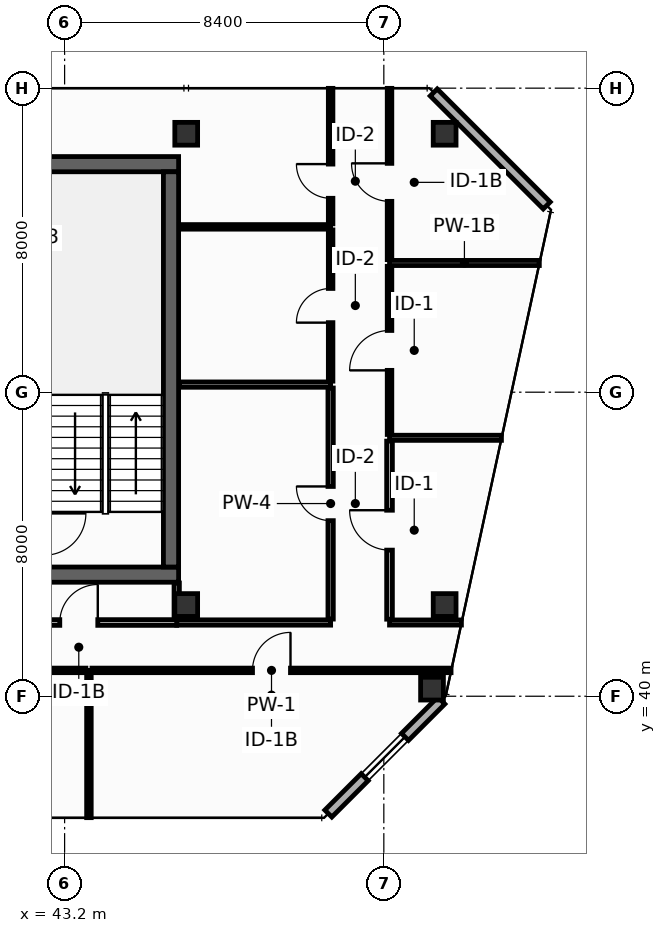
"""IFC4 building model, lengths in metres.
Left out: names, types, materials, properties, quantities, classifications, styles, units other than length and angle.
Written with IfcOpenShell. Run it as: python <this file> out.ifc"""

import sys

from ifc_helpers import new_model, si_unit, direction, frame, frame_2d, origin, origin_2d, place, context, subcontext, project, spatial, rectangle, hollow_rectangle, extrude, element, fill, save


model = new_model("IFC4")
c1 = context("Model", 3, precision=1e-05, world=origin(), true_north=direction((0.0, 1.0)))
c2 = subcontext(c1, "Body", "Model", "MODEL_VIEW")
j1 = project(units=[si_unit("LENGTHUNIT", "METRE"), si_unit("PLANEANGLEUNIT", "RADIAN")], contexts=[c1])
p1 = place(None, origin())
s1 = spatial("IfcSite", under=j1, at=p1, CompositionType="ELEMENT")
p2 = place(p1, origin())
s2 = spatial("IfcBuilding", under=s1, at=p2, CompositionType="ELEMENT")
p3 = place(p2, frame((0.0, 0.0, 319.2)))
s3 = spatial("IfcBuildingStorey", under=s2, at=p3, CompositionType="ELEMENT", Elevation=319.2)
p4 = place(p3, frame((13.7, 43.2, 0.0), z_axis=(0.0, 0.0, 1.0), x_axis=(1.0, 0.0, 0.0)))
e1 = element("IfcWall", 1, at=p4, inside=s3, PredefinedType="SHEAR", context=c2, shape_type="SweptSolid", body=[
    extrude(rectangle(XDim=32.5, YDim=0.4, at=frame_2d((16.25, 0.0))), origin(), (0.0, 0.0, 1.0), 3.95),
])
p5 = place(p4, frame((5.4, 0.0, 0.0)))
e2 = element("IfcOpeningElement", 2, at=p5, cuts=e1, PredefinedType="OPENING", context=c2, shape_type="SweptSolid", body=[
    extrude(rectangle(XDim=1.1, YDim=2.15, at=frame_2d((0.55, 1.075))), frame((0.0, 0.21, 0.0), z_axis=(0.0, -1.0, 0.0), x_axis=(1.0, 0.0, 0.0)), (0.0, 0.0, 1.0), 0.42),
])
p6 = place(p4, frame((25.6, 0.0, 0.0)))
e3 = element("IfcOpeningElement", 3, at=p6, cuts=e1, PredefinedType="OPENING", context=c2, shape_type="SweptSolid", body=[
    extrude(rectangle(XDim=1.1, YDim=2.15, at=frame_2d((0.55, 1.075))), frame((0.0, 0.21, 0.0), z_axis=(0.0, -1.0, 0.0), x_axis=(1.0, 0.0, 0.0)), (0.0, 0.0, 1.0), 0.42),
])
p7 = place(p3, frame((13.7, 54.0, 0.0), z_axis=(0.0, 0.0, 1.0), x_axis=(1.0, 0.0, 0.0)))
e4 = element("IfcWall", 4, at=p7, inside=s3, PredefinedType="SHEAR", context=c2, shape_type="SweptSolid", body=[
    extrude(rectangle(XDim=32.5, YDim=0.4, at=frame_2d((16.25, 0.0))), origin(), (0.0, 0.0, 1.0), 3.95),
])
p8 = place(p3, frame((46.0, 43.4, 0.0), z_axis=(0.0, 0.0, 1.0), x_axis=(0.0, 1.0, 0.0)))
e5 = element("IfcWall", 5, at=p8, inside=s3, PredefinedType="SHEAR", context=c2, shape_type="SweptSolid", body=[
    extrude(rectangle(XDim=10.4, YDim=0.4, at=frame_2d((5.2, 0.0))), origin(), (0.0, 0.0, 1.0), 3.95),
])
for number, where, z_axis, x_axis in (
    (6, (46.4, 54.8, 0.0), (0.0, 0.0, 1.0), (1.0, 0.0, 0.0)),
    (7, (53.2, 54.8, 0.0), (0.0, 0.0, 1.0), (1.0, 0.0, 0.0)),
    (8, (46.4, 42.4, 0.0), (0.0, 0.0, 1.0), (1.0, 0.0, 0.0)),
    (9, (53.2, 42.4, 0.0), (0.0, 0.0, 1.0), (1.0, 0.0, 0.0)),
    (10, (52.868, 40.2, 0.0), (0.0, 0.0, 1.0), (1.0, 0.0, 0.0)),
):
    element("IfcColumn", number, at=place(p3, frame(where, z_axis=z_axis, x_axis=x_axis)), inside=s3, PredefinedType="COLUMN", context=c2, shape_type="SweptSolid", body=[
        extrude(hollow_rectangle(XDim=0.6, YDim=0.6, WallThickness=0.028, at=origin_2d()), origin(), (0.0, 0.0, 1.0), 4.2),
    ])
p9 = place(p3, frame((50.14, 36.913, 0.0), z_axis=(0.0, 0.0, 1.0), x_axis=(0.70707775441, 0.707135806771, 0.0)))
e11 = element("IfcWall", 11, at=p9, inside=s3, PredefinedType="STANDARD", context=c2, shape_type="SweptSolid", body=[
    extrude(rectangle(XDim=4.206, YDim=0.26, at=frame_2d((2.103, 0.0))), origin(), (0.0, 0.0, 1.0), 3.95),
])
p10 = place(p9, frame((1.353, 0.0, 0.9)))
e12 = element("IfcOpeningElement", 12, at=p10, cuts=e11, PredefinedType="OPENING", context=c2, shape_type="SweptSolid", body=[
    extrude(rectangle(XDim=1.5, YDim=1.85, at=frame_2d((0.75, 0.925))), frame((0.0, 0.14, 0.0), z_axis=(0.0, -1.0, 0.0), x_axis=(1.0, 0.0, 0.0)), (0.0, 0.0, 1.0), 0.28),
])
p11 = place(p3, frame((55.887, 52.913, 0.0), z_axis=(0.0, 0.0, 1.0), x_axis=(-0.707106781187, 0.707106781187, 0.0)))
e13 = element("IfcWall", 13, at=p11, inside=s3, PredefinedType="STANDARD", context=c2, shape_type="SweptSolid", body=[
    extrude(rectangle(XDim=4.206, YDim=0.26, at=frame_2d((2.103, 0.0))), origin(), (0.0, 0.0, 1.0), 3.95),
])
p12 = place(p3, frame((46.15, 41.94, 0.0), z_axis=(0.0, 0.0, 1.0), x_axis=(1.0, 0.0, 0.0)))
e14 = element("IfcWall", 14, at=p12, inside=s3, PredefinedType="PARTITIONING", context=c2, shape_type="SweptSolid", body=[
    extrude(rectangle(XDim=4.05, YDim=0.14, at=frame_2d((2.025, 0.0))), origin(), (0.0, 0.0, 1.0), 3.95),
])
p13 = place(p3, frame((46.15, 42.03, 0.0), z_axis=(0.0, 0.0, 1.0), x_axis=(0.0, 1.0, 0.0)))
e15 = element("IfcWall", 15, at=p13, inside=s3, PredefinedType="PARTITIONING", context=c2, shape_type="SweptSolid", body=[
    extrude(rectangle(XDim=0.95, YDim=0.14, at=frame_2d((0.475, 0.0))), origin(), (0.0, 0.0, 1.0), 3.95),
])
p14 = place(p3, frame((46.22, 48.2, 0.0), z_axis=(0.0, 0.0, 1.0), x_axis=(1.0, 0.0, 0.0)))
e16 = element("IfcWall", 16, at=p14, inside=s3, PredefinedType="PARTITIONING", context=c2, shape_type="SweptSolid", body=[
    extrude(rectangle(XDim=3.98, YDim=0.14, at=frame_2d((1.99, 0.0))), origin(), (0.0, 0.0, 1.0), 3.95),
])
p15 = place(p3, frame((50.2, 42.03, 0.0), z_axis=(0.0, 0.0, 1.0), x_axis=(0.0, 1.0, 0.0)))
e17 = element("IfcWall", 17, at=p15, inside=s3, PredefinedType="PARTITIONING", context=c2, shape_type="SweptSolid", body=[
    extrude(rectangle(XDim=6.08, YDim=0.14, at=frame_2d((3.04, 0.0))), origin(), (0.0, 0.0, 1.0), 3.347),
])
p16 = place(p15, frame((2.59, 0.0, 0.0)))
e18 = element("IfcOpeningElement", 18, at=p16, cuts=e17, PredefinedType="OPENING", context=c2, shape_type="SweptSolid", body=[
    extrude(rectangle(XDim=0.9, YDim=2.1, at=frame_2d((0.45, 1.05))), frame((0.0, 0.08, 0.0), z_axis=(0.0, -1.0, 0.0), x_axis=(1.0, 0.0, 0.0)), (0.0, 0.0, 1.0), 0.16),
])
p17 = place(p3, frame((46.22, 52.35, 0.0), z_axis=(0.0, 0.0, 1.0), x_axis=(1.0, 0.0, 0.0)))
e19 = element("IfcWall", 19, at=p17, inside=s3, PredefinedType="PARTITIONING", context=c2, shape_type="SweptSolid", body=[
    extrude(rectangle(XDim=3.98, YDim=0.12, at=frame_2d((1.99, 0.0))), origin(), (0.0, 0.0, 1.0), 3.95),
])
p18 = place(p3, frame((50.2, 48.29, 0.0), z_axis=(0.0, 0.0, 1.0), x_axis=(0.0, 1.0, 0.0)))
e20 = element("IfcWall", 20, at=p18, inside=s3, PredefinedType="PARTITIONING", context=c2, shape_type="SweptSolid", body=[
    extrude(rectangle(XDim=3.98, YDim=0.12, at=frame_2d((1.99, 0.0))), origin(), (0.0, 0.0, 1.0), 3.95),
])
p19 = place(p18, frame((1.54, 0.0, 0.0)))
e21 = element("IfcOpeningElement", 21, at=p19, cuts=e20, PredefinedType="OPENING", context=c2, shape_type="SweptSolid", body=[
    extrude(rectangle(XDim=0.9, YDim=2.1, at=frame_2d((0.45, 1.05))), frame((0.0, 0.07, 0.0), z_axis=(0.0, -1.0, 0.0), x_axis=(1.0, 0.0, 0.0)), (0.0, 0.0, 1.0), 0.14),
])
p20 = place(p3, frame((50.2, 52.43, 0.0), z_axis=(0.0, 0.0, 1.0), x_axis=(0.0, 1.0, 0.0)))
e22 = element("IfcWall", 22, at=p20, inside=s3, PredefinedType="PARTITIONING", context=c2, shape_type="SweptSolid", body=[
    extrude(rectangle(XDim=3.565, YDim=0.12, at=frame_2d((1.783, 0.0))), origin(), (0.0, 0.0, 1.0), 3.335),
])
p21 = place(p20, frame((0.672, 0.0, 0.0)))
e23 = element("IfcOpeningElement", 23, at=p21, cuts=e22, PredefinedType="OPENING", context=c2, shape_type="SweptSolid", body=[
    extrude(rectangle(XDim=0.9, YDim=2.1, at=frame_2d((0.45, 1.05))), frame((0.0, 0.07, 0.0), z_axis=(0.0, -1.0, 0.0), x_axis=(1.0, 0.0, 0.0)), (0.0, 0.0, 1.0), 0.14),
])
p22 = place(p3, frame((51.75, 41.94, 0.0), z_axis=(0.0, 0.0, 1.0), x_axis=(1.0, 0.0, 0.0)))
e24 = element("IfcWall", 24, at=p22, inside=s3, PredefinedType="PARTITIONING", context=c2, shape_type="SweptSolid", body=[
    extrude(rectangle(XDim=1.892, YDim=0.135, at=frame_2d((0.946, 0.0))), origin(), (0.0, 0.0, 1.0), 3.485),
])
p23 = place(p3, frame((51.75, 46.8, 0.0), z_axis=(0.0, 0.0, 1.0), x_axis=(1.0, 0.0, 0.0)))
e25 = element("IfcWall", 25, at=p23, inside=s3, PredefinedType="PARTITIONING", context=c2, shape_type="SweptSolid", body=[
    extrude(rectangle(XDim=2.945, YDim=0.135, at=frame_2d((1.472, 0.0))), origin(), (0.0, 0.0, 1.0), 3.347),
])
p24 = place(p3, frame((51.75, 51.4, 0.0), z_axis=(0.0, 0.0, 1.0), x_axis=(1.0, 0.0, 0.0)))
e26 = element("IfcWall", 26, at=p24, inside=s3, PredefinedType="PARTITIONING", context=c2, shape_type="SweptSolid", body=[
    extrude(rectangle(XDim=3.942, YDim=0.135, at=frame_2d((1.971, 0.0))), origin(), (0.0, 0.0, 1.0), 3.347),
])
p25 = place(p3, frame((51.75, 42.028, 0.0), z_axis=(0.0, 0.0, 1.0), x_axis=(0.0, 1.0, 0.0)))
e27 = element("IfcWall", 27, at=p25, inside=s3, PredefinedType="PARTITIONING", context=c2, shape_type="SweptSolid", body=[
    extrude(rectangle(XDim=4.685, YDim=0.15, at=frame_2d((2.342, 0.0))), origin(), (0.0, 0.0, 1.0), 3.347),
])
p26 = place(p25, frame((1.817, 0.0, 0.0)))
e28 = element("IfcOpeningElement", 28, at=p26, cuts=e27, PredefinedType="OPENING", context=c2, shape_type="SweptSolid", body=[
    extrude(rectangle(XDim=1.05, YDim=2.15, at=frame_2d((0.525, 1.075))), frame((0.0, 0.085, 0.0), z_axis=(0.0, -1.0, 0.0), x_axis=(1.0, 0.0, 0.0)), (0.0, 0.0, 1.0), 0.17),
])
p27 = place(p3, frame((51.75, 46.887, 0.0), z_axis=(0.0, 0.0, 1.0), x_axis=(0.0, 1.0, 0.0)))
e29 = element("IfcWall", 29, at=p27, inside=s3, PredefinedType="PARTITIONING", context=c2, shape_type="SweptSolid", body=[
    extrude(rectangle(XDim=4.425, YDim=0.12, at=frame_2d((2.212, 0.0))), origin(), (0.0, 0.0, 1.0), 3.95),
])
p28 = place(p27, frame((1.687, 0.0, 0.0)))
e30 = element("IfcOpeningElement", 30, at=p28, cuts=e29, PredefinedType="OPENING", context=c2, shape_type="SweptSolid", body=[
    extrude(rectangle(XDim=1.05, YDim=2.15, at=frame_2d((0.525, 1.075))), frame((0.0, 0.07, 0.0), z_axis=(0.0, -1.0, 0.0), x_axis=(1.0, 0.0, 0.0)), (0.0, 0.0, 1.0), 0.14),
])
p29 = place(p3, frame((51.75, 51.488, 0.0), z_axis=(0.0, 0.0, 1.0), x_axis=(0.0, 1.0, 0.0)))
e31 = element("IfcWall", 31, at=p29, inside=s3, PredefinedType="PARTITIONING", context=c2, shape_type="SweptSolid", body=[
    extrude(rectangle(XDim=4.508, YDim=0.12, at=frame_2d((2.254, 0.0))), origin(), (0.0, 0.0, 1.0), 3.335),
])
p30 = place(p29, frame((1.534, 0.0, 0.0)))
e32 = element("IfcOpeningElement", 32, at=p30, cuts=e31, PredefinedType="OPENING", context=c2, shape_type="SweptSolid", body=[
    extrude(rectangle(XDim=1.0, YDim=2.15, at=frame_2d((0.5, 1.075))), frame((0.0, 0.07, 0.0), z_axis=(0.0, -1.0, 0.0), x_axis=(1.0, 0.0, 0.0)), (0.0, 0.0, 1.0), 0.14),
])
p31 = place(p3, frame((40.995, 41.94, 0.0), z_axis=(0.0, 0.0, 1.0), x_axis=(1.0, 0.0, 0.0)))
e33 = element("IfcWall", 33, at=p31, inside=s3, PredefinedType="PARTITIONING", context=c2, shape_type="SweptSolid", body=[
    extrude(rectangle(XDim=5.155, YDim=0.15, at=frame_2d((2.577, 0.0))), origin(), (0.0, 0.0, 1.0), 3.95),
])
p32 = place(p31, frame((2.078, 0.0, 0.0)))
e34 = element("IfcOpeningElement", 34, at=p32, cuts=e33, PredefinedType="OPENING", context=c2, shape_type="SweptSolid", body=[
    extrude(rectangle(XDim=1.0, YDim=2.15, at=frame_2d((0.5, 1.075))), frame((0.0, 0.085, 0.0), z_axis=(0.0, -1.0, 0.0), x_axis=(1.0, 0.0, 0.0)), (0.0, 0.0, 1.0), 0.17),
])
p33 = place(p3, frame((43.84, 36.805, 0.0), z_axis=(0.0, 0.0, 1.0), x_axis=(0.0, 1.0, 0.0)))
e35 = element("IfcWall", 35, at=p33, inside=s3, PredefinedType="PARTITIONING", context=c2, shape_type="SweptSolid", body=[
    extrude(rectangle(XDim=3.875, YDim=0.12, at=frame_2d((1.938, 0.0))), origin(), (0.0, 0.0, 1.0), 3.95),
])
p34 = place(p3, frame((36.067, 40.68, 0.0), z_axis=(0.0, 0.0, 1.0), x_axis=(1.0, 0.0, 0.0)))
e36 = element("IfcWall", 36, at=p34, inside=s3, PredefinedType="PARTITIONING", context=c2, shape_type="SweptSolid", body=[
    extrude(rectangle(XDim=7.693, YDim=0.12, at=frame_2d((3.846, 0.0))), origin(), (0.0, 0.0, 1.0), 3.95),
])
p35 = place(p34, frame((3.321, 0.0, 0.0)))
e37 = element("IfcOpeningElement", 37, at=p35, cuts=e36, PredefinedType="OPENING", context=c2, shape_type="SweptSolid", body=[
    extrude(rectangle(XDim=1.05, YDim=2.15, at=frame_2d((0.525, 1.075))), frame((0.0, 0.07, 0.0), z_axis=(0.0, -1.0, 0.0), x_axis=(1.0, 0.0, 0.0)), (0.0, 0.0, 1.0), 0.14),
])
p36 = place(p3, frame((43.92, 40.68, 0.0), z_axis=(0.0, 0.0, 1.0), x_axis=(1.0, 0.0, 0.0)))
e38 = element("IfcWall", 38, at=p36, inside=s3, PredefinedType="PARTITIONING", context=c2, shape_type="SweptSolid", body=[
    extrude(rectangle(XDim=9.449, YDim=0.12, at=frame_2d((4.725, 0.0))), origin(), (0.0, 0.0, 1.0), 3.485),
])
p37 = place(p36, frame((4.224, 0.0, 0.0)))
e39 = element("IfcOpeningElement", 39, at=p37, cuts=e38, PredefinedType="OPENING", context=c2, shape_type="SweptSolid", body=[
    extrude(rectangle(XDim=1.0, YDim=2.15, at=frame_2d((0.5, 1.075))), frame((0.0, 0.07, 0.0), z_axis=(0.0, -1.0, 0.0), x_axis=(1.0, 0.0, 0.0)), (0.0, 0.0, 1.0), 0.14),
])
p38 = place(p10, origin())
e40 = element("IfcWindow", 40, at=p38, inside=s3, PartitioningType="SINGLE_PANEL", PredefinedType="WINDOW", context=c2, shape_type="SweptSolid", body=[
    extrude(rectangle(XDim=1.5, YDim=1.85, at=frame_2d((0.75, 0.925))), frame((0.0, 0.03, 0.0), z_axis=(0.0, -1.0, 0.0), x_axis=(1.0, 0.0, 0.0)), (0.0, 0.0, 1.0), 0.06),
])
fill(e12, e40)
p39 = place(p16, origin())
e41 = element("IfcDoor", 41, at=p39, inside=s3, OperationType="SINGLE_SWING_RIGHT", PredefinedType="DOOR", context=c2, shape_type="SweptSolid", body=[
    extrude(rectangle(XDim=0.9, YDim=2.1, at=frame_2d((0.45, 1.05))), frame((0.0, 0.025, 0.0), z_axis=(0.0, -1.0, 0.0), x_axis=(1.0, 0.0, 0.0)), (0.0, 0.0, 1.0), 0.05),
])
fill(e18, e41)
p40 = place(p19, origin())
e42 = element("IfcDoor", 42, at=p40, inside=s3, OperationType="SINGLE_SWING_LEFT", PredefinedType="DOOR", context=c2, shape_type="SweptSolid", body=[
    extrude(rectangle(XDim=0.9, YDim=2.1, at=frame_2d((0.45, 1.05))), frame((0.0, 0.025, 0.0), z_axis=(0.0, -1.0, 0.0), x_axis=(1.0, 0.0, 0.0)), (0.0, 0.0, 1.0), 0.05),
])
fill(e21, e42)
p41 = place(p21, origin())
e43 = element("IfcDoor", 43, at=p41, inside=s3, OperationType="SINGLE_SWING_RIGHT", PredefinedType="DOOR", context=c2, shape_type="SweptSolid", body=[
    extrude(rectangle(XDim=0.9, YDim=2.1, at=frame_2d((0.45, 1.05))), frame((0.0, 0.025, 0.0), z_axis=(0.0, -1.0, 0.0), x_axis=(1.0, 0.0, 0.0)), (0.0, 0.0, 1.0), 0.05),
])
fill(e23, e43)
p42 = place(p26, origin())
e44 = element("IfcDoor", 44, at=p42, inside=s3, OperationType="SINGLE_SWING_RIGHT", PredefinedType="DOOR", context=c2, shape_type="SweptSolid", body=[
    extrude(rectangle(XDim=1.05, YDim=2.15, at=frame_2d((0.525, 1.075))), frame((0.0, 0.025, 0.0), z_axis=(0.0, -1.0, 0.0), x_axis=(1.0, 0.0, 0.0)), (0.0, 0.0, 1.0), 0.05),
])
fill(e28, e44)
p43 = place(p28, origin())
e45 = element("IfcDoor", 45, at=p43, inside=s3, OperationType="SINGLE_SWING_LEFT", PredefinedType="DOOR", context=c2, shape_type="SweptSolid", body=[
    extrude(rectangle(XDim=1.05, YDim=2.15, at=frame_2d((0.525, 1.075))), frame((0.0, 0.025, 0.0), z_axis=(0.0, -1.0, 0.0), x_axis=(1.0, 0.0, 0.0)), (0.0, 0.0, 1.0), 0.05),
])
fill(e30, e45)
p44 = place(p30, origin())
e46 = element("IfcDoor", 46, at=p44, inside=s3, OperationType="SINGLE_SWING_RIGHT", PredefinedType="DOOR", context=c2, shape_type="SweptSolid", body=[
    extrude(rectangle(XDim=1.0, YDim=2.15, at=frame_2d((0.5, 1.075))), frame((0.0, 0.025, 0.0), z_axis=(0.0, -1.0, 0.0), x_axis=(1.0, 0.0, 0.0)), (0.0, 0.0, 1.0), 0.05),
])
fill(e32, e46)
p45 = place(p32, origin())
e47 = element("IfcDoor", 47, at=p45, inside=s3, OperationType="SINGLE_SWING_RIGHT", PredefinedType="DOOR", context=c2, shape_type="SweptSolid", body=[
    extrude(rectangle(XDim=1.0, YDim=2.15, at=frame_2d((0.5, 1.075))), frame((0.0, 0.025, 0.0), z_axis=(0.0, -1.0, 0.0), x_axis=(1.0, 0.0, 0.0)), (0.0, 0.0, 1.0), 0.05),
])
fill(e34, e47)
p46 = place(p37, origin())
e48 = element("IfcDoor", 48, at=p46, inside=s3, OperationType="SINGLE_SWING_RIGHT", PredefinedType="DOOR", context=c2, shape_type="SweptSolid", body=[
    extrude(rectangle(XDim=1.0, YDim=2.15, at=frame_2d((0.5, 1.075))), frame((0.0, 0.025, 0.0), z_axis=(0.0, -1.0, 0.0), x_axis=(1.0, 0.0, 0.0)), (0.0, 0.0, 1.0), 0.05),
])
fill(e39, e48)
save(model, sys.argv[1])
